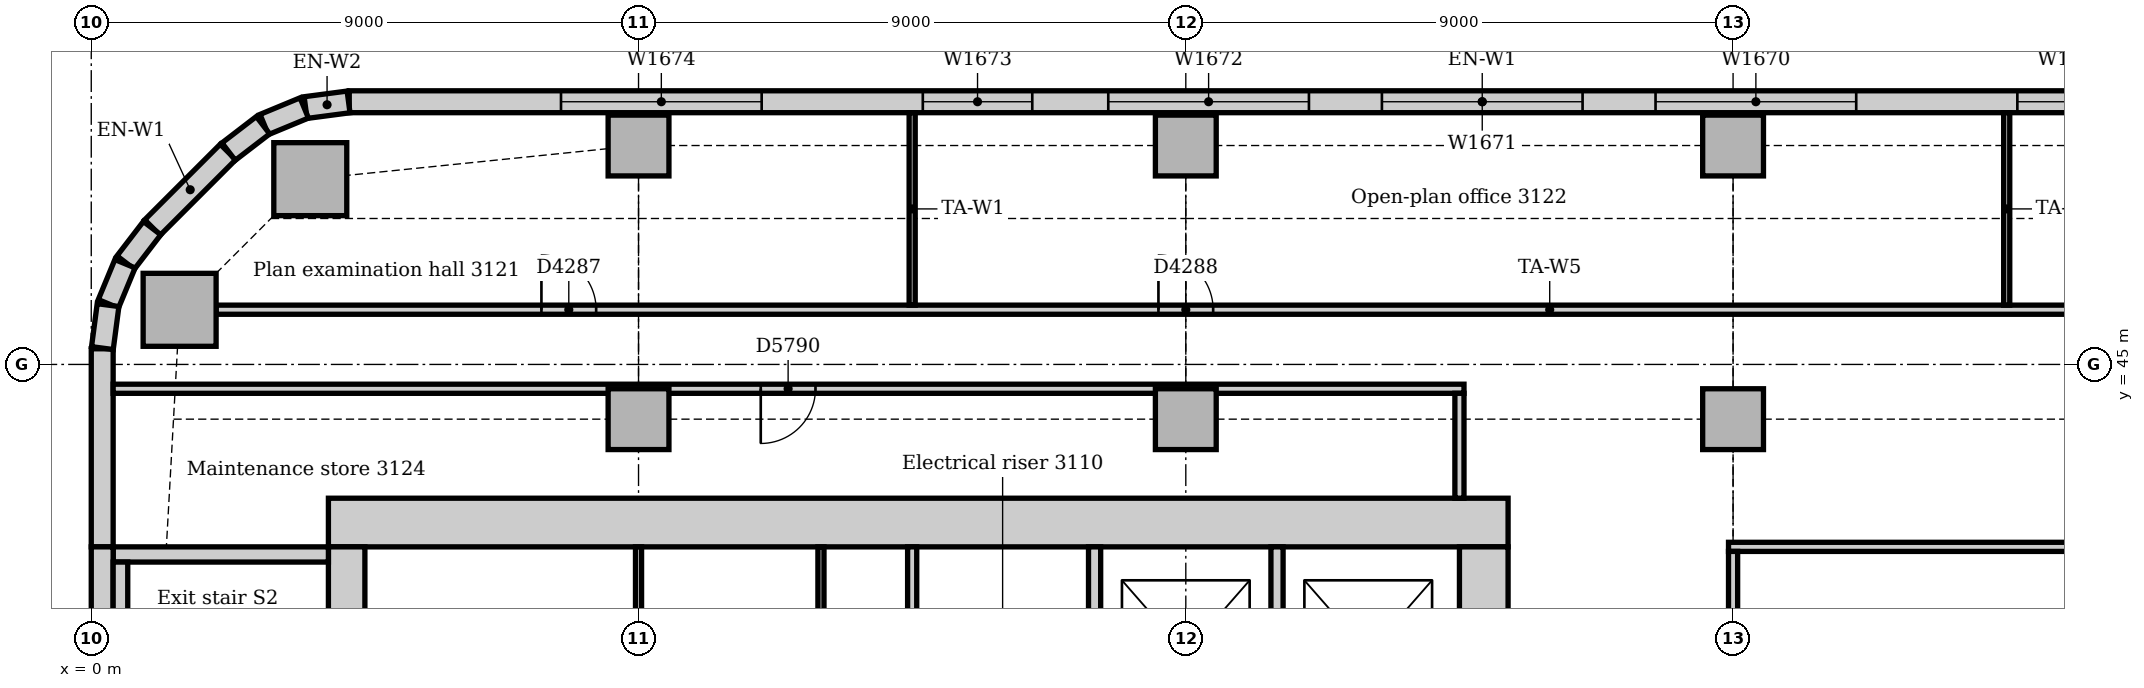
"""IFC4 building model, lengths in metres.
Left out: names, types, materials, properties, quantities, classifications, styles, units other than length and angle.
Written with IfcOpenShell. Run it as: python <this file> out.ifc"""

import sys

from ifc_helpers import new_model, si_unit, direction, frame, frame_2d, origin, origin_2d, place, context, subcontext, project, spatial, rectangle, extrude, element, fill, save


model = new_model("IFC4")
c1 = context("Model", 3, precision=1e-05, world=origin(), true_north=direction((0.0, 1.0)))
c2 = subcontext(c1, "Body", "Model", "MODEL_VIEW")
j1 = project(units=[si_unit("LENGTHUNIT", "METRE"), si_unit("PLANEANGLEUNIT", "RADIAN")], contexts=[c1])
p1 = place(None, origin())
s1 = spatial("IfcSite", under=j1, at=p1, CompositionType="ELEMENT")
p2 = place(p1, origin())
s2 = spatial("IfcBuilding", under=s1, at=p2, CompositionType="ELEMENT")
p3 = place(p2, frame((0.0, 0.0, 132.0)))
s3 = spatial("IfcBuildingStorey", under=s2, at=p3, CompositionType="ELEMENT", Elevation=132.0)
p4 = place(p3, frame((23.3, 42.4, 0.0), z_axis=(0.0, 0.0, 1.0), x_axis=(-1.0, 0.0, 0.0)))
e1 = element("IfcWall", 1, at=p4, inside=s3, PredefinedType="SOLIDWALL", context=c2, shape_type="SweptSolid", body=[
    extrude(rectangle(XDim=19.4, YDim=0.8, at=frame_2d((9.7, 0.0))), origin(), (0.0, 0.0, 1.0), 4.0),
])
p5 = place(p3, frame((22.9, 31.5, 0.0), z_axis=(0.0, 0.0, 1.0), x_axis=(0.0, 1.0, 0.0)))
e2 = element("IfcWall", 2, at=p5, inside=s3, PredefinedType="SOLIDWALL", context=c2, shape_type="SweptSolid", body=[
    extrude(rectangle(XDim=10.5, YDim=0.8, at=frame_2d((5.25, 0.0))), origin(), (0.0, 0.0, 1.0), 4.0),
])
p6 = place(p5, frame((3.15, 0.0, 0.0)))
e3 = element("IfcOpeningElement", 3, at=p6, cuts=e2, PredefinedType="OPENING", context=c2, shape_type="SweptSolid", body=[
    extrude(rectangle(XDim=1.0, YDim=2.1, at=frame_2d((0.5, 1.05))), frame((0.0, 0.41, 0.0), z_axis=(0.0, -1.0, 0.0), x_axis=(1.0, 0.0, 0.0)), (0.0, 0.0, 1.0), 0.82),
])
p7 = place(p5, frame((5.2, 0.0, 0.0)))
e4 = element("IfcOpeningElement", 4, at=p7, cuts=e2, PredefinedType="OPENING", context=c2, shape_type="SweptSolid", body=[
    extrude(rectangle(XDim=1.0, YDim=2.1, at=frame_2d((0.5, 1.05))), frame((0.0, 0.41, 0.0), z_axis=(0.0, -1.0, 0.0), x_axis=(1.0, 0.0, 0.0)), (0.0, 0.0, 1.0), 0.82),
])
p8 = place(p3, frame((4.2, 42.0, 0.0), z_axis=(0.0, 0.0, 1.0), x_axis=(0.0, -1.0, 0.0)))
e5 = element("IfcWall", 5, at=p8, inside=s3, PredefinedType="SOLIDWALL", context=c2, shape_type="SweptSolid", body=[
    extrude(rectangle(XDim=10.5, YDim=0.6, at=frame_2d((5.25, 0.0))), origin(), (0.0, 0.0, 1.0), 4.0),
])
p9 = place(p8, frame((5.3, 0.0, 0.0)))
e6 = element("IfcOpeningElement", 6, at=p9, cuts=e5, PredefinedType="OPENING", context=c2, shape_type="SweptSolid", body=[
    extrude(rectangle(XDim=1.0, YDim=2.1, at=frame_2d((0.5, 1.05))), frame((0.0, 0.31, 0.0), z_axis=(0.0, -1.0, 0.0), x_axis=(1.0, 0.0, 0.0)), (0.0, 0.0, 1.0), 0.62),
])
p10 = place(p3, frame((3.9, 41.875, 0.0), z_axis=(0.0, 0.0, 1.0), x_axis=(-1.0, 0.0, 0.0)))
e7 = element("IfcWall", 7, at=p10, inside=s3, PredefinedType="SOLIDWALL", context=c2, shape_type="SweptSolid", body=[
    extrude(rectangle(XDim=3.54, YDim=0.25, at=frame_2d((1.77, 0.0))), origin(), (0.0, 0.0, 1.0), 4.0),
])
for number, where, z_axis, x_axis in (
    (8, (3.602, 48.047, 0.0), (0.0, 0.0, 1.0), (1.0, 0.0, 0.0)),
    (9, (1.453, 45.898, 0.0), (0.0, 0.0, 1.0), (1.0, 0.0, 0.0)),
):
    element("IfcColumn", number, at=place(p3, frame(where, z_axis=z_axis, x_axis=x_axis)), inside=s3, PredefinedType="COLUMN", context=c2, shape_type="SweptSolid", body=[
        extrude(rectangle(XDim=1.2, YDim=1.2, at=origin_2d()), origin(), (0.0, 0.0, 1.0), 3.85),
    ])
for number, where, z_axis, x_axis in (
    (10, (9.0, 48.6, 0.0), (0.0, 0.0, 1.0), (1.0, 0.0, 0.0)),
    (11, (18.0, 48.6, 0.0), (0.0, 0.0, 1.0), (1.0, 0.0, 0.0)),
    (12, (27.0, 48.6, 0.0), (0.0, 0.0, 1.0), (1.0, 0.0, 0.0)),
    (13, (9.0, 44.1, 0.0), (0.0, 0.0, 1.0), (1.0, 0.0, 0.0)),
    (14, (18.0, 44.1, 0.0), (0.0, 0.0, 1.0), (1.0, 0.0, 0.0)),
    (15, (27.0, 44.1, 0.0), (0.0, 0.0, 1.0), (1.0, 0.0, 0.0)),
):
    element("IfcColumn", number, at=place(p3, frame(where, z_axis=z_axis, x_axis=x_axis)), inside=s3, PredefinedType="COLUMN", context=c2, shape_type="SweptSolid", body=[
        extrude(rectangle(XDim=1.0, YDim=1.0, at=origin_2d()), origin(), (0.0, 0.0, 1.0), 3.85),
    ])
p11 = place(p3, frame((41.507, 49.32, 0.0), z_axis=(0.0, 0.0, 1.0), x_axis=(-1.0, 0.0, 0.0)))
e16 = element("IfcWall", 16, at=p11, inside=s3, PredefinedType="STANDARD", context=c2, shape_type="SweptSolid", body=[
    extrude(rectangle(XDim=37.265, YDim=0.36, at=frame_2d((18.632, 0.0))), origin(), (0.0, 0.0, 1.0), 3.85),
])
p12 = place(p11, frame((3.482, 0.0, 0.9)))
e17 = element("IfcOpeningElement", 17, at=p12, cuts=e16, PredefinedType="OPENING", context=c2, shape_type="SweptSolid", body=[
    extrude(rectangle(XDim=3.3, YDim=1.6, at=frame_2d((1.65, 0.8))), frame((0.0, 0.19, 0.0), z_axis=(0.0, -1.0, 0.0), x_axis=(1.0, 0.0, 0.0)), (0.0, 0.0, 1.0), 0.38),
])
p13 = place(p11, frame((8.032, 0.0, 0.9)))
e18 = element("IfcOpeningElement", 18, at=p13, cuts=e16, PredefinedType="OPENING", context=c2, shape_type="SweptSolid", body=[
    extrude(rectangle(XDim=1.8, YDim=1.6, at=frame_2d((0.9, 0.8))), frame((0.0, 0.19, 0.0), z_axis=(0.0, -1.0, 0.0), x_axis=(1.0, 0.0, 0.0)), (0.0, 0.0, 1.0), 0.38),
])
p14 = place(p11, frame((12.482, 0.0, 0.9)))
e19 = element("IfcOpeningElement", 19, at=p14, cuts=e16, PredefinedType="OPENING", context=c2, shape_type="SweptSolid", body=[
    extrude(rectangle(XDim=3.3, YDim=1.6, at=frame_2d((1.65, 0.8))), frame((0.0, 0.19, 0.0), z_axis=(0.0, -1.0, 0.0), x_axis=(1.0, 0.0, 0.0)), (0.0, 0.0, 1.0), 0.38),
])
p15 = place(p11, frame((16.982, 0.0, 0.9)))
e20 = element("IfcOpeningElement", 20, at=p15, cuts=e16, PredefinedType="OPENING", context=c2, shape_type="SweptSolid", body=[
    extrude(rectangle(XDim=3.3, YDim=1.6, at=frame_2d((1.65, 0.8))), frame((0.0, 0.19, 0.0), z_axis=(0.0, -1.0, 0.0), x_axis=(1.0, 0.0, 0.0)), (0.0, 0.0, 1.0), 0.38),
])
p16 = place(p11, frame((21.482, 0.0, 0.9)))
e21 = element("IfcOpeningElement", 21, at=p16, cuts=e16, PredefinedType="OPENING", context=c2, shape_type="SweptSolid", body=[
    extrude(rectangle(XDim=3.3, YDim=1.6, at=frame_2d((1.65, 0.8))), frame((0.0, 0.19, 0.0), z_axis=(0.0, -1.0, 0.0), x_axis=(1.0, 0.0, 0.0)), (0.0, 0.0, 1.0), 0.38),
])
p17 = place(p11, frame((26.032, 0.0, 0.9)))
e22 = element("IfcOpeningElement", 22, at=p17, cuts=e16, PredefinedType="OPENING", context=c2, shape_type="SweptSolid", body=[
    extrude(rectangle(XDim=1.8, YDim=1.6, at=frame_2d((0.9, 0.8))), frame((0.0, 0.19, 0.0), z_axis=(0.0, -1.0, 0.0), x_axis=(1.0, 0.0, 0.0)), (0.0, 0.0, 1.0), 0.38),
])
p18 = place(p11, frame((30.482, 0.0, 0.9)))
e23 = element("IfcOpeningElement", 23, at=p18, cuts=e16, PredefinedType="OPENING", context=c2, shape_type="SweptSolid", body=[
    extrude(rectangle(XDim=3.3, YDim=1.6, at=frame_2d((1.65, 0.8))), frame((0.0, 0.19, 0.0), z_axis=(0.0, -1.0, 0.0), x_axis=(1.0, 0.0, 0.0)), (0.0, 0.0, 1.0), 0.38),
])
p19 = place(p3, frame((2.249, 48.494, 0.0), z_axis=(0.0, 0.0, 1.0), x_axis=(-0.707106781187, -0.707106781187, 0.0)))
e24 = element("IfcWall", 24, at=p19, inside=s3, PredefinedType="STANDARD", context=c2, shape_type="SweptSolid", body=[
    extrude(rectangle(XDim=1.757, YDim=0.36, at=frame_2d((0.879, 0.0))), origin(), (0.0, 0.0, 1.0), 3.85),
])
p20 = place(p3, frame((0.18, 45.257, 0.0), z_axis=(0.0, 0.0, 1.0), x_axis=(0.0, -1.0, 0.0)))
e25 = element("IfcWall", 25, at=p20, inside=s3, PredefinedType="STANDARD", context=c2, shape_type="SweptSolid", body=[
    extrude(rectangle(XDim=3.257, YDim=0.36, at=frame_2d((1.629, 0.0))), origin(), (0.0, 0.0, 1.0), 3.85),
])
p21 = place(p3, frame((0.18, 42.0, 0.0), z_axis=(0.0, 0.0, 1.0), x_axis=(0.0, -1.0, 0.0)))
e26 = element("IfcWall", 26, at=p21, inside=s3, PredefinedType="STANDARD", context=c2, shape_type="SweptSolid", body=[
    extrude(rectangle(XDim=6.75, YDim=0.36, at=frame_2d((3.375, 0.0))), origin(), (0.0, 0.0, 1.0), 3.85),
])
for number, where, z_axis, x_axis in (
    (27, (4.231, 49.317, 0.0), (0.0, 0.0, 1.0), (-0.991, -0.131, 0.0)),
    (28, (3.503, 49.218, 0.0), (0.0, 0.0, 1.0), (-0.924, -0.383, 0.0)),
):
    element("IfcWall", number, at=place(p3, frame(where, z_axis=z_axis, x_axis=x_axis)), inside=s3, PredefinedType="STANDARD", context=c2, shape_type="SweptSolid", body=[
        extrude(rectangle(XDim=0.713, YDim=0.36, at=frame_2d((0.356, 0.0))), origin(), (0.0, 0.0, 1.0), 3.85),
    ])
for number, where, z_axis, x_axis in (
    (29, (2.825, 48.934, 0.0), (0.0, 0.0, 1.0), (-0.793, -0.609, 0.0)),
    (30, (1.0, 47.241, 0.0), (0.0, 0.0, 1.0), (-0.609, -0.793, 0.0)),
):
    element("IfcWall", number, at=place(p3, frame(where, z_axis=z_axis, x_axis=x_axis)), inside=s3, PredefinedType="STANDARD", context=c2, shape_type="SweptSolid", body=[
        extrude(rectangle(XDim=0.713, YDim=0.36, at=frame_2d((0.357, 0.0))), origin(), (0.0, 0.0, 1.0), 3.85),
    ])
for number, where, z_axis, x_axis in (
    (31, (0.555, 46.656, 0.0), (0.0, 0.0, 1.0), (-0.383, -0.924, 0.0)),
    (32, (0.276, 45.976, 0.0), (0.0, 0.0, 1.0), (-0.131, -0.991, 0.0)),
):
    element("IfcWall", number, at=place(p3, frame(where, z_axis=z_axis, x_axis=x_axis)), inside=s3, PredefinedType="STANDARD", context=c2, shape_type="SweptSolid", body=[
        extrude(rectangle(XDim=0.713, YDim=0.36, at=frame_2d((0.356, 0.0))), origin(), (0.0, 0.0, 1.0), 3.85),
    ])
p22 = place(p3, frame((0.48, 40.13, 0.0), z_axis=(0.0, 0.0, 1.0), x_axis=(0.0, 1.0, 0.0)))
e33 = element("IfcWall", 33, at=p22, inside=s3, PredefinedType="STANDARD", context=c2, shape_type="SweptSolid", body=[
    extrude(rectangle(XDim=1.62, YDim=0.24, at=frame_2d((0.81, 0.0))), origin(), (0.0, 0.0, 1.0), 4.0),
])
for number, where, z_axis, x_axis in (
    (34, (16.5, 38.6, 0.0), (0.0, 0.0, 1.0), (0.0, 1.0, 0.0)),
    (35, (19.5, 38.6, 0.0), (0.0, 0.0, 1.0), (0.0, 1.0, 0.0)),
):
    element("IfcWall", number, at=place(p3, frame(where, z_axis=z_axis, x_axis=x_axis)), inside=s3, PredefinedType="PARTITIONING", context=c2, shape_type="SweptSolid", body=[
        extrude(rectangle(XDim=3.4, YDim=0.2, at=frame_2d((1.7, 0.0))), origin(), (0.0, 0.0, 1.0), 3.85),
    ])
p23 = place(p3, frame((2.053, 45.9, 0.0), z_axis=(0.0, 0.0, 1.0), x_axis=(1.0, 0.0, 0.0)))
e36 = element("IfcWall", 36, at=p23, inside=s3, PredefinedType="PARTITIONING", context=c2, shape_type="SweptSolid", body=[
    extrude(rectangle(XDim=43.863, YDim=0.15, at=frame_2d((21.931, 0.0))), origin(), (0.0, 0.0, 1.0), 3.85),
])
p24 = place(p23, frame((5.35, 0.0, 0.0)))
e37 = element("IfcOpeningElement", 37, at=p24, cuts=e36, PredefinedType="OPENING", context=c2, shape_type="SweptSolid", body=[
    extrude(rectangle(XDim=0.9, YDim=2.1, at=frame_2d((0.45, 1.05))), frame((0.0, 0.085, 0.0), z_axis=(0.0, -1.0, 0.0), x_axis=(1.0, 0.0, 0.0)), (0.0, 0.0, 1.0), 0.17),
])
p25 = place(p23, frame((15.497, 0.0, 0.0)))
e38 = element("IfcOpeningElement", 38, at=p25, cuts=e36, PredefinedType="OPENING", context=c2, shape_type="SweptSolid", body=[
    extrude(rectangle(XDim=0.9, YDim=2.1, at=frame_2d((0.45, 1.05))), frame((0.0, 0.085, 0.0), z_axis=(0.0, -1.0, 0.0), x_axis=(1.0, 0.0, 0.0)), (0.0, 0.0, 1.0), 0.17),
])
p26 = place(p23, frame((36.147, 0.0, 0.0)))
e39 = element("IfcOpeningElement", 39, at=p26, cuts=e36, PredefinedType="OPENING", context=c2, shape_type="SweptSolid", body=[
    extrude(rectangle(XDim=0.9, YDim=2.1, at=frame_2d((0.45, 1.05))), frame((0.0, 0.085, 0.0), z_axis=(0.0, -1.0, 0.0), x_axis=(1.0, 0.0, 0.0)), (0.0, 0.0, 1.0), 0.17),
])
p27 = place(p3, frame((26.925, 42.0, 0.0), z_axis=(0.0, 0.0, 1.0), x_axis=(1.0, 0.0, 0.0)))
e40 = element("IfcWall", 40, at=p27, inside=s3, PredefinedType="PARTITIONING", context=c2, shape_type="SweptSolid", body=[
    extrude(rectangle(XDim=22.891, YDim=0.15, at=frame_2d((11.445, 0.0))), origin(), (0.0, 0.0, 1.0), 3.85),
])
p28 = place(p3, frame((0.36, 44.6, 0.0), z_axis=(0.0, 0.0, 1.0), x_axis=(1.0, 0.0, 0.0)))
e41 = element("IfcWall", 41, at=p28, inside=s3, PredefinedType="PARTITIONING", context=c2, shape_type="SweptSolid", body=[
    extrude(rectangle(XDim=22.215, YDim=0.15, at=frame_2d((11.107, 0.0))), origin(), (0.0, 0.0, 1.0), 3.85),
])
p29 = place(p28, frame((10.65, 0.0, 0.0)))
e42 = element("IfcOpeningElement", 42, at=p29, cuts=e41, PredefinedType="OPENING", context=c2, shape_type="SweptSolid", body=[
    extrude(rectangle(XDim=0.9, YDim=2.1, at=frame_2d((0.45, 1.05))), frame((0.0, 0.085, 0.0), z_axis=(0.0, -1.0, 0.0), x_axis=(1.0, 0.0, 0.0)), (0.0, 0.0, 1.0), 0.17),
])
p30 = place(p3, frame((27.0, 36.5, 0.0), z_axis=(0.0, 0.0, 1.0), x_axis=(0.0, 1.0, 0.0)))
e43 = element("IfcWall", 43, at=p30, inside=s3, PredefinedType="PARTITIONING", context=c2, shape_type="SweptSolid", body=[
    extrude(rectangle(XDim=5.425, YDim=0.15, at=frame_2d((2.712, 0.0))), origin(), (0.0, 0.0, 1.0), 3.256),
])
p31 = place(p3, frame((22.5, 42.8, 0.0), z_axis=(0.0, 0.0, 1.0), x_axis=(0.0, 1.0, 0.0)))
e44 = element("IfcWall", 44, at=p31, inside=s3, PredefinedType="PARTITIONING", context=c2, shape_type="SweptSolid", body=[
    extrude(rectangle(XDim=1.725, YDim=0.15, at=frame_2d((0.863, 0.0))), origin(), (0.0, 0.0, 1.0), 3.85),
])
p32 = place(p3, frame((13.5, 38.575, 0.0), z_axis=(0.0, 0.0, 1.0), x_axis=(0.0, 1.0, 0.0)))
e45 = element("IfcWall", 45, at=p32, inside=s3, PredefinedType="PARTITIONING", context=c2, shape_type="SweptSolid", body=[
    extrude(rectangle(XDim=3.425, YDim=0.15, at=frame_2d((1.712, 0.0))), origin(), (0.0, 0.0, 1.0), 3.85),
])
for number, where, z_axis, x_axis in (
    (46, (9.0, 38.575, 0.0), (0.0, 0.0, 1.0), (0.0, 1.0, 0.0)),
    (47, (12.0, 38.575, 0.0), (0.0, 0.0, 1.0), (0.0, 1.0, 0.0)),
):
    element("IfcWall", number, at=place(p3, frame(where, z_axis=z_axis, x_axis=x_axis)), inside=s3, PredefinedType="PARTITIONING", context=c2, shape_type="SweptSolid", body=[
        extrude(rectangle(XDim=3.425, YDim=0.1, at=frame_2d((1.712, 0.0))), origin(), (0.0, 0.0, 1.0), 3.85),
    ])
for number, where, z_axis, x_axis in (
    (48, (13.5, 45.975, 0.0), (0.0, 0.0, 1.0), (0.0, 1.0, 0.0)),
    (49, (31.5, 45.975, 0.0), (0.0, 0.0, 1.0), (0.0, 1.0, 0.0)),
):
    element("IfcWall", number, at=place(p3, frame(where, z_axis=z_axis, x_axis=x_axis)), inside=s3, PredefinedType="PARTITIONING", context=c2, shape_type="SweptSolid", body=[
        extrude(rectangle(XDim=3.165, YDim=0.1, at=frame_2d((1.583, 0.0))), origin(), (0.0, 0.0, 1.0), 3.85),
    ])
p33 = place(p13, origin())
e50 = element("IfcWindow", 50, at=p33, inside=s3, PartitioningType="SINGLE_PANEL", PredefinedType="WINDOW", context=c2, shape_type="SweptSolid", body=[
    extrude(rectangle(XDim=1.8, YDim=1.6, at=frame_2d((0.9, 0.8))), frame((0.0, 0.13, 0.0), z_axis=(0.0, -1.0, 0.0), x_axis=(1.0, 0.0, 0.0)), (0.0, 0.0, 1.0), 0.06),
])
fill(e18, e50)
p34 = place(p14, origin())
e51 = element("IfcWindow", 51, at=p34, inside=s3, PartitioningType="SINGLE_PANEL", PredefinedType="WINDOW", context=c2, shape_type="SweptSolid", body=[
    extrude(rectangle(XDim=3.3, YDim=1.6, at=frame_2d((1.65, 0.8))), frame((0.0, 0.13, 0.0), z_axis=(0.0, -1.0, 0.0), x_axis=(1.0, 0.0, 0.0)), (0.0, 0.0, 1.0), 0.06),
])
fill(e19, e51)
p35 = place(p15, origin())
e52 = element("IfcWindow", 52, at=p35, inside=s3, PartitioningType="SINGLE_PANEL", PredefinedType="WINDOW", context=c2, shape_type="SweptSolid", body=[
    extrude(rectangle(XDim=3.3, YDim=1.6, at=frame_2d((1.65, 0.8))), frame((0.0, 0.13, 0.0), z_axis=(0.0, -1.0, 0.0), x_axis=(1.0, 0.0, 0.0)), (0.0, 0.0, 1.0), 0.06),
])
fill(e20, e52)
p36 = place(p16, origin())
e53 = element("IfcWindow", 53, at=p36, inside=s3, PartitioningType="SINGLE_PANEL", PredefinedType="WINDOW", context=c2, shape_type="SweptSolid", body=[
    extrude(rectangle(XDim=3.3, YDim=1.6, at=frame_2d((1.65, 0.8))), frame((0.0, 0.13, 0.0), z_axis=(0.0, -1.0, 0.0), x_axis=(1.0, 0.0, 0.0)), (0.0, 0.0, 1.0), 0.06),
])
fill(e21, e53)
p37 = place(p17, origin())
e54 = element("IfcWindow", 54, at=p37, inside=s3, PartitioningType="SINGLE_PANEL", PredefinedType="WINDOW", context=c2, shape_type="SweptSolid", body=[
    extrude(rectangle(XDim=1.8, YDim=1.6, at=frame_2d((0.9, 0.8))), frame((0.0, 0.13, 0.0), z_axis=(0.0, -1.0, 0.0), x_axis=(1.0, 0.0, 0.0)), (0.0, 0.0, 1.0), 0.06),
])
fill(e22, e54)
p38 = place(p18, origin())
e55 = element("IfcWindow", 55, at=p38, inside=s3, PartitioningType="SINGLE_PANEL", PredefinedType="WINDOW", context=c2, shape_type="SweptSolid", body=[
    extrude(rectangle(XDim=3.3, YDim=1.6, at=frame_2d((1.65, 0.8))), frame((0.0, 0.13, 0.0), z_axis=(0.0, -1.0, 0.0), x_axis=(1.0, 0.0, 0.0)), (0.0, 0.0, 1.0), 0.06),
])
fill(e23, e55)
p39 = place(p24, origin())
e56 = element("IfcDoor", 56, at=p39, inside=s3, OperationType="SINGLE_SWING_LEFT", PredefinedType="DOOR", context=c2, shape_type="SweptSolid", body=[
    extrude(rectangle(XDim=0.9, YDim=2.1, at=frame_2d((0.45, 1.05))), frame((0.0, 0.025, 0.0), z_axis=(0.0, -1.0, 0.0), x_axis=(1.0, 0.0, 0.0)), (0.0, 0.0, 1.0), 0.05),
])
fill(e37, e56)
p40 = place(p25, origin())
e57 = element("IfcDoor", 57, at=p40, inside=s3, OperationType="SINGLE_SWING_LEFT", PredefinedType="DOOR", context=c2, shape_type="SweptSolid", body=[
    extrude(rectangle(XDim=0.9, YDim=2.1, at=frame_2d((0.45, 1.05))), frame((0.0, 0.025, 0.0), z_axis=(0.0, -1.0, 0.0), x_axis=(1.0, 0.0, 0.0)), (0.0, 0.0, 1.0), 0.05),
])
fill(e38, e57)
p41 = place(p29, frame((0.9, 0.0, 0.0), z_axis=(0.0, 0.0, 1.0), x_axis=(-1.0, 0.0, 0.0)))
e58 = element("IfcDoor", 58, at=p41, inside=s3, OperationType="SINGLE_SWING_RIGHT", PredefinedType="DOOR", context=c2, shape_type="SweptSolid", body=[
    extrude(rectangle(XDim=0.9, YDim=2.1, at=frame_2d((0.45, 1.05))), frame((0.0, 0.025, 0.0), z_axis=(0.0, -1.0, 0.0), x_axis=(1.0, 0.0, 0.0)), (0.0, 0.0, 1.0), 0.05),
])
fill(e42, e58)
save(model, sys.argv[1])
